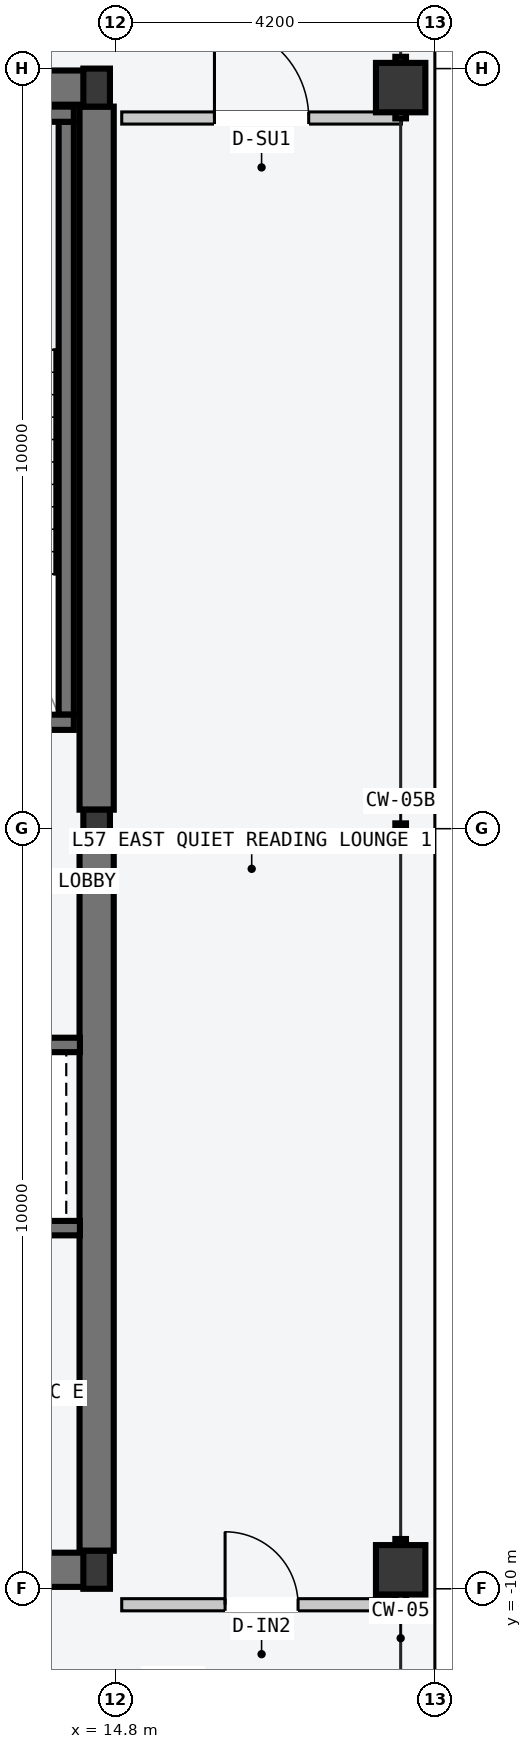
"""IFC4 building model, lengths in metres.
Left out: names, types, materials, properties, quantities, classifications, styles, units other than length and angle.
Written with IfcOpenShell. Run it as: python <this file> out.ifc"""

import sys

from ifc_helpers import new_model, si_unit, direction, frame, frame_2d, origin, origin_2d, place, context, subcontext, project, spatial, rectangle, hollow_rectangle, i_section, extrude, element, fill, save


model = new_model("IFC4")
c1 = context("Model", 3, precision=1e-05, world=origin(), true_north=direction((0.0, 1.0)))
c2 = subcontext(c1, "Body", "Model", "MODEL_VIEW")
j1 = project(units=[si_unit("LENGTHUNIT", "METRE"), si_unit("PLANEANGLEUNIT", "RADIAN")], contexts=[c1])
p1 = place(None, origin())
s1 = spatial("IfcSite", under=j1, at=p1, CompositionType="ELEMENT")
p2 = place(p1, origin())
s2 = spatial("IfcBuilding", under=s1, at=p2, CompositionType="ELEMENT")
p3 = place(p2, frame((0.0, 0.0, 218.4)))
s3 = spatial("IfcBuildingStorey", under=s2, at=p3, CompositionType="ELEMENT", Elevation=218.4)
for number, where, z_axis, x_axis in (
    (1, (8.07, -9.75, -0.2), (0.0, 0.0, 1.0), (1.0, 0.0, 0.0)),
    (2, (8.07, 9.75, -0.2), (0.0, 0.0, 1.0), (1.0, 0.0, 0.0)),
):
    element("IfcWall", number, at=place(p3, frame(where, z_axis=z_axis, x_axis=x_axis)), inside=s3, PredefinedType="SHEAR", context=c2, shape_type="SweptSolid", body=[
        extrude(rectangle(XDim=6.46, YDim=0.45, at=frame_2d((3.23, 0.0))), origin(), (0.0, 0.0, 1.0), 3.6),
    ])
for number, where, z_axis, x_axis in (
    (3, (14.55, -9.5, -0.2), (0.0, 0.0, 1.0), (0.0, 1.0, 0.0)),
    (4, (14.55, 0.25, -0.2), (0.0, 0.0, 1.0), (0.0, 1.0, 0.0)),
):
    element("IfcWall", number, at=place(p3, frame(where, z_axis=z_axis, x_axis=x_axis)), inside=s3, PredefinedType="SHEAR", context=c2, shape_type="SweptSolid", body=[
        extrude(rectangle(XDim=9.25, YDim=0.45, at=frame_2d((4.625, 0.0))), origin(), (0.0, 0.0, 1.0), 3.6),
    ])
p4 = place(p3, frame((14.15, 1.5, -0.2), z_axis=(0.0, 0.0, 1.0), x_axis=(0.0, 1.0, 0.0)))
e5 = element("IfcWall", 5, at=p4, inside=s3, PredefinedType="SOLIDWALL", context=c2, shape_type="SweptSolid", body=[
    extrude(rectangle(XDim=7.8, YDim=0.2, at=frame_2d((3.9, 0.0))), origin(), (0.0, 0.0, 1.0), 3.6),
])
p5 = place(p3, frame((10.53, 1.4, -0.2), z_axis=(0.0, 0.0, 1.0), x_axis=(1.0, 0.0, 0.0)))
e6 = element("IfcWall", 6, at=p5, inside=s3, PredefinedType="SOLIDWALL", context=c2, shape_type="SweptSolid", body=[
    extrude(rectangle(XDim=3.72, YDim=0.2, at=frame_2d((1.86, 0.0))), origin(), (0.0, 0.0, 1.0), 3.6),
])
p6 = place(p5, frame((1.5, 0.0, 0.2)))
e7 = element("IfcOpeningElement", 7, at=p6, cuts=e6, PredefinedType="OPENING", context=c2, shape_type="SweptSolid", body=[
    extrude(rectangle(XDim=1.12, YDim=2.18, at=frame_2d((0.56, 1.09))), frame((0.0, 0.11, 0.0), z_axis=(0.0, -1.0, 0.0), x_axis=(1.0, 0.0, 0.0)), (0.0, 0.0, 1.0), 0.22),
])
p7 = place(p3, frame((10.53, 9.4, -0.2), z_axis=(0.0, 0.0, 1.0), x_axis=(1.0, 0.0, 0.0)))
e8 = element("IfcWall", 8, at=p7, inside=s3, PredefinedType="SOLIDWALL", context=c2, shape_type="SweptSolid", body=[
    extrude(rectangle(XDim=3.72, YDim=0.2, at=frame_2d((1.86, 0.0))), origin(), (0.0, 0.0, 1.0), 3.6),
])
for number, where, z_axis, x_axis in (
    (9, (14.55, -9.75, 0.0), (0.0, 0.0, 1.0), (1.0, 0.0, 0.0)),
    (10, (14.55, 0.0, 0.0), (0.0, 0.0, 1.0), (1.0, 0.0, 0.0)),
    (11, (14.55, 9.75, 0.0), (0.0, 0.0, 1.0), (1.0, 0.0, 0.0)),
):
    element("IfcColumn", number, at=place(p3, frame(where, z_axis=z_axis, x_axis=x_axis)), inside=s3, PredefinedType="COLUMN", context=c2, shape_type="SweptSolid", body=[
        extrude(i_section(OverallWidth=0.35, OverallDepth=0.5, WebThickness=0.02, FlangeThickness=0.032, at=origin_2d()), origin(), (0.0, 0.0, 1.0), 3.6),
    ])
for number, where, z_axis, x_axis in (
    (12, (18.55, -9.75, 0.0), (0.0, 0.0, 1.0), (0.0, 1.0, 0.0)),
    (13, (18.55, 9.75, 0.0), (0.0, 0.0, 1.0), (0.0, 1.0, 0.0)),
):
    element("IfcColumn", number, at=place(p3, frame(where, z_axis=z_axis, x_axis=x_axis)), inside=s3, PredefinedType="COLUMN", context=c2, shape_type="SweptSolid", body=[
        extrude(hollow_rectangle(XDim=0.65, YDim=0.65, WallThickness=0.028, at=origin_2d()), origin(), (0.0, 0.0, 1.0), 3.6),
    ])
p8 = place(p3, frame((11.65, -2.845, -0.2), z_axis=(0.0, 0.0, 1.0), x_axis=(1.0, 0.0, 0.0)))
e14 = element("IfcWall", 14, at=p8, inside=s3, PredefinedType="SOLIDWALL", context=c2, shape_type="SweptSolid", body=[
    extrude(rectangle(XDim=2.68, YDim=0.19, at=frame_2d((1.34, 0.0))), origin(), (0.0, 0.0, 1.0), 3.6),
])
p9 = place(p8, frame((0.65, 0.0, 0.2)))
e15 = element("IfcOpeningElement", 15, at=p9, cuts=e14, PredefinedType="OPENING", context=c2, shape_type="SweptSolid", body=[
    extrude(rectangle(XDim=1.2, YDim=2.2, at=frame_2d((0.6, 1.1))), frame((0.0, 0.105, 0.0), z_axis=(0.0, -1.0, 0.0), x_axis=(1.0, 0.0, 0.0)), (0.0, 0.0, 1.0), 0.21),
])
p10 = place(p3, frame((11.65, -5.255, -0.2), z_axis=(0.0, 0.0, 1.0), x_axis=(1.0, 0.0, 0.0)))
e16 = element("IfcWall", 16, at=p10, inside=s3, PredefinedType="SOLIDWALL", context=c2, shape_type="SweptSolid", body=[
    extrude(rectangle(XDim=2.68, YDim=0.19, at=frame_2d((1.34, 0.0))), origin(), (0.0, 0.0, 1.0), 3.6),
])
p11 = place(p3, frame((14.88, 9.35, 0.0), z_axis=(0.0, 0.0, 1.0), x_axis=(1.0, 0.0, 0.0)))
e17 = element("IfcWall", 17, at=p11, inside=s3, PredefinedType="PARTITIONING", context=c2, shape_type="SweptSolid", body=[
    extrude(rectangle(XDim=3.68, YDim=0.16, at=frame_2d((1.84, 0.0))), origin(), (0.0, 0.0, 1.0), 3.4),
])
p12 = place(p11, frame((1.22, 0.0, 0.0)))
e18 = element("IfcOpeningElement", 18, at=p12, cuts=e17, PredefinedType="OPENING", context=c2, shape_type="SweptSolid", body=[
    extrude(rectangle(XDim=1.24, YDim=2.24, at=frame_2d((0.62, 1.12))), frame((0.0, 0.09, 0.0), z_axis=(0.0, -1.0, 0.0), x_axis=(1.0, 0.0, 0.0)), (0.0, 0.0, 1.0), 0.18),
])
p13 = place(p3, frame((14.88, -10.21, 0.0), z_axis=(0.0, 0.0, 1.0), x_axis=(1.0, 0.0, 0.0)))
e19 = element("IfcWall", 19, at=p13, inside=s3, PredefinedType="PARTITIONING", context=c2, shape_type="SweptSolid", body=[
    extrude(rectangle(XDim=3.68, YDim=0.16, at=frame_2d((1.84, 0.0))), origin(), (0.0, 0.0, 1.0), 3.4),
])
p14 = place(p13, frame((1.36, 0.0, 0.0)))
e20 = element("IfcOpeningElement", 20, at=p14, cuts=e19, PredefinedType="OPENING", context=c2, shape_type="SweptSolid", body=[
    extrude(rectangle(XDim=0.96, YDim=2.18, at=frame_2d((0.48, 1.09))), frame((0.0, 0.09, 0.0), z_axis=(0.0, -1.0, 0.0), x_axis=(1.0, 0.0, 0.0)), (0.0, 0.0, 1.0), 0.18),
])
p15 = place(p12, origin())
e21 = element("IfcDoor", 21, at=p15, inside=s3, OperationType="SINGLE_SWING_LEFT", PredefinedType="DOOR", context=c2, shape_type="SweptSolid", body=[
    extrude(rectangle(XDim=1.24, YDim=2.24, at=frame_2d((0.62, 1.12))), frame((0.0, 0.025, 0.0), z_axis=(0.0, -1.0, 0.0), x_axis=(1.0, 0.0, 0.0)), (0.0, 0.0, 1.0), 0.05),
])
fill(e18, e21)
p16 = place(p14, origin())
e22 = element("IfcDoor", 22, at=p16, inside=s3, OperationType="SINGLE_SWING_LEFT", PredefinedType="DOOR", context=c2, shape_type="SweptSolid", body=[
    extrude(rectangle(XDim=0.96, YDim=2.18, at=frame_2d((0.48, 1.09))), frame((0.0, 0.025, 0.0), z_axis=(0.0, -1.0, 0.0), x_axis=(1.0, 0.0, 0.0)), (0.0, 0.0, 1.0), 0.05),
])
fill(e20, e22)
save(model, sys.argv[1])
